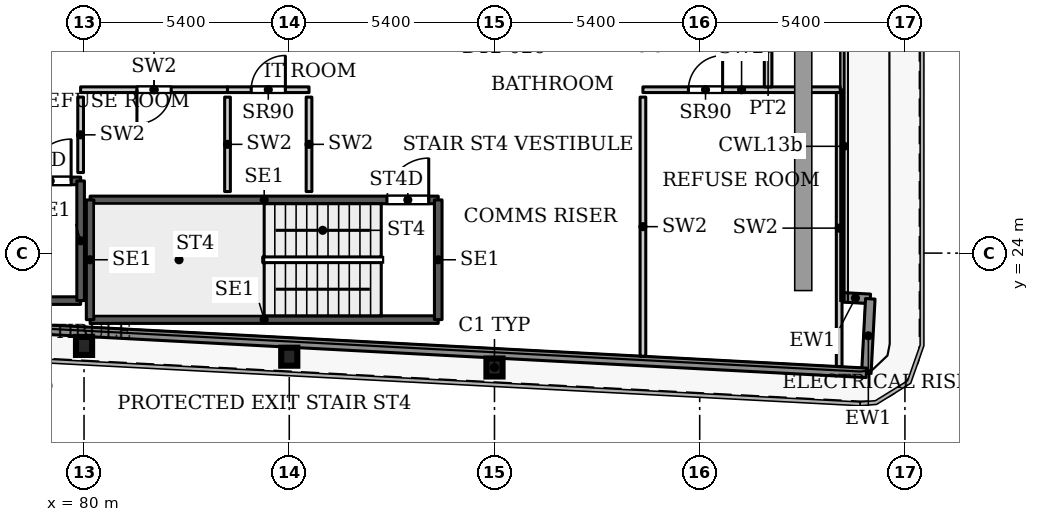
"""IFC4 building model, lengths in metres.
Left out: names, types, materials, properties, quantities, classifications, styles, units other than length and angle.
Written with IfcOpenShell. Run it as: python <this file> out.ifc"""

import sys

from ifc_helpers import new_model, si_unit, direction, frame, frame_2d, origin, origin_2d, place, context, subcontext, project, spatial, rectangle, i_section, extrude, source, transform, mapped, element, fill, save


model = new_model("IFC4")
c1 = context("Model", 3, precision=1e-05, world=origin(), true_north=direction((0.0, 1.0)))
c2 = subcontext(c1, "Body", "Model", "MODEL_VIEW")
j1 = project(units=[si_unit("LENGTHUNIT", "METRE"), si_unit("PLANEANGLEUNIT", "RADIAN")], contexts=[c1])
p1 = place(None, origin())
s1 = spatial("IfcSite", under=j1, at=p1, CompositionType="ELEMENT")
p2 = place(p1, origin())
s2 = spatial("IfcBuilding", under=s1, at=p2, CompositionType="ELEMENT")
p3 = place(p2, frame((0.0, 0.0, 53.9)))
s3 = spatial("IfcBuildingStorey", under=s2, at=p3, CompositionType="ELEMENT", Elevation=53.9)
for number, where, z_axis, x_axis in (
    (1, (90.8, 20.99, 0.0), (0.0, 0.0, 1.0), (1.0, 0.0, 0.0)),
    (2, (85.4, 21.274, 0.0), (0.0, 0.0, 1.0), (1.0, 0.0, 0.0)),
    (3, (80.0, 21.558, 0.0), (0.0, 0.0, 1.0), (1.0, 0.0, 0.0)),
):
    element("IfcColumn", number, at=place(p3, frame(where, z_axis=z_axis, x_axis=x_axis)), inside=s3, PredefinedType="COLUMN", context=c2, shape_type="SweptSolid", body=[
        extrude(i_section(OverallWidth=0.424, OverallDepth=0.474, WebThickness=0.048, FlangeThickness=0.077, FilletRadius=0.014, at=origin_2d()), origin(), (0.0, 0.0, 1.0), 3.9),
    ])
p4 = place(p3, frame((99.907, 22.839, 0.0), z_axis=(0.0, 0.0, 1.0), x_axis=(0.998561284263, -0.053622398031, 0.0)))
e4 = element("IfcWall", 4, at=p4, inside=s3, PredefinedType="SOLIDWALL", context=c2, shape_type="SweptSolid", body=[
    extrude(rectangle(XDim=0.783, YDim=0.25, at=frame_2d((0.392, 0.0))), origin(), (0.0, 0.0, 1.0), 3.75),
])
p5 = place(p3, frame((100.689, 22.797, 0.0), z_axis=(0.0, 0.0, 1.0), x_axis=(-0.052841433274, -0.998602915542, 0.0)))
e5 = element("IfcWall", 5, at=p5, inside=s3, PredefinedType="SOLIDWALL", context=c2, shape_type="SweptSolid", body=[
    extrude(rectangle(XDim=1.95, YDim=0.25, at=frame_2d((0.975, 0.0))), origin(), (0.0, 0.0, 1.0), 3.75),
])
p6 = place(p3, frame((100.586, 20.85, 0.0), z_axis=(0.0, 0.0, 1.0), x_axis=(-0.99861746497, 0.052565755559, 0.0)))
e6 = element("IfcWall", 6, at=p6, inside=s3, PredefinedType="SOLIDWALL", context=c2, shape_type="SweptSolid", body=[
    extrude(rectangle(XDim=66.639, YDim=0.25, at=frame_2d((33.319, 0.0))), origin(), (0.0, 0.0, 1.0), 3.75),
])
p7 = place(p3, frame((80.16, 22.25, 0.0), z_axis=(0.0, 0.0, 1.0), x_axis=(1.0, 0.0, 0.0)))
e7 = element("IfcWall", 7, at=p7, inside=s3, PredefinedType="SHEAR", context=c2, shape_type="SweptSolid", body=[
    extrude(rectangle(XDim=9.16, YDim=0.2, at=frame_2d((4.58, 0.0))), origin(), (0.0, 0.0, 1.0), 3.9),
])
p8 = place(p3, frame((80.16, 25.4, 0.0), z_axis=(0.0, 0.0, 1.0), x_axis=(1.0, 0.0, 0.0)))
e8 = element("IfcWall", 8, at=p8, inside=s3, PredefinedType="SHEAR", context=c2, shape_type="SweptSolid", body=[
    extrude(rectangle(XDim=9.16, YDim=0.2, at=frame_2d((4.58, 0.0))), origin(), (0.0, 0.0, 1.0), 3.9),
])
p9 = place(p8, frame((7.81, 0.0, 0.0)))
e9 = element("IfcOpeningElement", 9, at=p9, cuts=e8, PredefinedType="OPENING", context=c2, shape_type="SweptSolid", body=[
    extrude(rectangle(XDim=1.1, YDim=2.2, at=frame_2d((0.55, 1.1))), frame((0.0, 0.11, 0.0), z_axis=(0.0, -1.0, 0.0), x_axis=(1.0, 0.0, 0.0)), (0.0, 0.0, 1.0), 0.22),
])
for number, where, z_axis, x_axis in (
    (10, (80.16, 22.25, 0.0), (0.0, 0.0, 1.0), (0.0, 1.0, 0.0)),
    (11, (89.32, 22.25, 0.0), (0.0, 0.0, 1.0), (0.0, 1.0, 0.0)),
):
    element("IfcWall", number, at=place(p3, frame(where, z_axis=z_axis, x_axis=x_axis)), inside=s3, PredefinedType="SHEAR", context=c2, shape_type="SweptSolid", body=[
        extrude(rectangle(XDim=3.15, YDim=0.2, at=frame_2d((1.575, 0.0))), origin(), (0.0, 0.0, 1.0), 3.9),
    ])
p10 = place(p3, frame((70.75, 22.75, 0.0), z_axis=(0.0, 0.0, 1.0), x_axis=(1.0, 0.0, 0.0)))
e12 = element("IfcWall", 12, at=p10, inside=s3, PredefinedType="SHEAR", context=c2, shape_type="SweptSolid", body=[
    extrude(rectangle(XDim=9.16, YDim=0.2, at=frame_2d((4.58, 0.0))), origin(), (0.0, 0.0, 1.0), 3.9),
])
p11 = place(p3, frame((70.75, 25.9, 0.0), z_axis=(0.0, 0.0, 1.0), x_axis=(1.0, 0.0, 0.0)))
e13 = element("IfcWall", 13, at=p11, inside=s3, PredefinedType="SHEAR", context=c2, shape_type="SweptSolid", body=[
    extrude(rectangle(XDim=9.16, YDim=0.2, at=frame_2d((4.58, 0.0))), origin(), (0.0, 0.0, 1.0), 3.9),
])
p12 = place(p11, frame((7.81, 0.0, 0.0)))
e14 = element("IfcOpeningElement", 14, at=p12, cuts=e13, PredefinedType="OPENING", context=c2, shape_type="SweptSolid", body=[
    extrude(rectangle(XDim=1.1, YDim=2.2, at=frame_2d((0.55, 1.1))), frame((0.0, 0.11, 0.0), z_axis=(0.0, -1.0, 0.0), x_axis=(1.0, 0.0, 0.0)), (0.0, 0.0, 1.0), 0.22),
])
p13 = place(p3, frame((79.91, 22.75, 0.0), z_axis=(0.0, 0.0, 1.0), x_axis=(0.0, 1.0, 0.0)))
e15 = element("IfcWall", 15, at=p13, inside=s3, PredefinedType="SHEAR", context=c2, shape_type="SweptSolid", body=[
    extrude(rectangle(XDim=3.15, YDim=0.2, at=frame_2d((1.575, 0.0))), origin(), (0.0, 0.0, 1.0), 3.9),
])
p14 = place(p3, frame((79.91, 28.3, 0.0), z_axis=(0.0, 0.0, 1.0), x_axis=(1.0, 0.0, 0.0)))
e16 = element("IfcWall", 16, at=p14, inside=s3, PredefinedType="PARTITIONING", context=c2, shape_type="SweptSolid", body=[
    extrude(rectangle(XDim=3.865, YDim=0.15, at=frame_2d((1.933, 0.0))), origin(), (0.0, 0.0, 1.0), 3.9),
])
p15 = place(p14, frame((1.482, 0.0, 0.0)))
e17 = element("IfcOpeningElement", 17, at=p15, cuts=e16, PredefinedType="OPENING", context=c2, shape_type="SweptSolid", body=[
    extrude(rectangle(XDim=0.9, YDim=2.2, at=frame_2d((0.45, 1.1))), frame((0.0, 0.085, 0.0), z_axis=(0.0, -1.0, 0.0), x_axis=(1.0, 0.0, 0.0)), (0.0, 0.0, 1.0), 0.17),
])
p16 = place(p3, frame((79.91, 26.12, 0.0), z_axis=(0.0, 0.0, 1.0), x_axis=(0.0, 1.0, 0.0)))
e18 = element("IfcWall", 18, at=p16, inside=s3, PredefinedType="PARTITIONING", context=c2, shape_type="SweptSolid", body=[
    extrude(rectangle(XDim=1.985, YDim=0.15, at=frame_2d((0.992, 0.0))), origin(), (0.0, 0.0, 1.0), 3.9),
])
p17 = place(p3, frame((83.775, 25.62, 0.0), z_axis=(0.0, 0.0, 1.0), x_axis=(0.0, 1.0, 0.0)))
e19 = element("IfcWall", 19, at=p17, inside=s3, PredefinedType="PARTITIONING", context=c2, shape_type="SweptSolid", body=[
    extrude(rectangle(XDim=2.485, YDim=0.15, at=frame_2d((1.242, 0.0))), origin(), (0.0, 0.0, 1.0), 3.9),
])
p18 = place(p3, frame((83.775, 28.3, 0.0), z_axis=(0.0, 0.0, 1.0), x_axis=(1.0, 0.0, 0.0)))
e20 = element("IfcWall", 20, at=p18, inside=s3, PredefinedType="PARTITIONING", context=c2, shape_type="SweptSolid", body=[
    extrude(rectangle(XDim=2.145, YDim=0.15, at=frame_2d((1.073, 0.0))), origin(), (0.0, 0.0, 1.0), 3.9),
])
p19 = place(p18, frame((0.623, 0.0, 0.0)))
e21 = element("IfcOpeningElement", 21, at=p19, cuts=e20, PredefinedType="OPENING", context=c2, shape_type="SweptSolid", body=[
    extrude(rectangle(XDim=0.9, YDim=2.2, at=frame_2d((0.45, 1.1))), frame((0.0, 0.085, 0.0), z_axis=(0.0, -1.0, 0.0), x_axis=(1.0, 0.0, 0.0)), (0.0, 0.0, 1.0), 0.17),
])
p20 = place(p3, frame((85.92, 25.62, 0.0), z_axis=(0.0, 0.0, 1.0), x_axis=(0.0, 1.0, 0.0)))
e22 = element("IfcWall", 22, at=p20, inside=s3, PredefinedType="PARTITIONING", context=c2, shape_type="SweptSolid", body=[
    extrude(rectangle(XDim=2.485, YDim=0.15, at=frame_2d((1.242, 0.0))), origin(), (0.0, 0.0, 1.0), 3.9),
])
p21 = place(p3, frame((99.87, 21.015, 0.0), z_axis=(0.0, 0.0, 1.0), x_axis=(0.0, 1.0, 0.0)))
e23 = element("IfcWall", 23, at=p21, inside=s3, PredefinedType="PARTITIONING", context=c2, shape_type="SweptSolid", body=[
    extrude(rectangle(XDim=7.285, YDim=0.15, at=frame_2d((3.643, 0.0))), origin(), (0.0, 0.0, 1.0), 3.9),
])
p22 = place(p3, frame((94.706, 28.3, 0.0), z_axis=(0.0, 0.0, 1.0), x_axis=(1.0, 0.0, 0.0)))
e24 = element("IfcWall", 24, at=p22, inside=s3, PredefinedType="PARTITIONING", context=c2, shape_type="SweptSolid", body=[
    extrude(rectangle(XDim=5.192, YDim=0.15, at=frame_2d((2.596, 0.0))), origin(), (0.0, 0.0, 1.0), 3.9),
])
p23 = place(p22, frame((1.197, 0.0, 0.0)))
e25 = element("IfcOpeningElement", 25, at=p23, cuts=e24, PredefinedType="OPENING", context=c2, shape_type="SweptSolid", body=[
    extrude(rectangle(XDim=0.9, YDim=2.2, at=frame_2d((0.45, 1.1))), frame((0.0, 0.085, 0.0), z_axis=(0.0, -1.0, 0.0), x_axis=(1.0, 0.0, 0.0)), (0.0, 0.0, 1.0), 0.17),
])
p24 = place(p3, frame((94.706, 21.287, 0.0), z_axis=(0.0, 0.0, 1.0), x_axis=(0.0, 1.0, 0.0)))
e26 = element("IfcWall", 26, at=p24, inside=s3, PredefinedType="PARTITIONING", context=c2, shape_type="SweptSolid", body=[
    extrude(rectangle(XDim=6.818, YDim=0.15, at=frame_2d((3.409, 0.0))), origin(), (0.0, 0.0, 1.0), 3.9),
])
p25 = place(p3, frame((98.0, 28.374, 0.0), z_axis=(0.0, 0.0, 1.0), x_axis=(0.0, 1.0, 0.0)))
e27 = element("IfcWall", 27, at=p25, inside=s3, PredefinedType="PARTITIONING", context=c2, shape_type="SweptSolid", body=[
    extrude(rectangle(XDim=2.026, YDim=0.2, at=frame_2d((1.013, 0.0))), origin(), (0.0, 0.0, 1.0), 3.6),
])
m1 = source(origin(), c2, "Body", "SweptSolid", [
    extrude(rectangle(XDim=0.9, YDim=2.2, at=frame_2d((0.45, 1.1))), frame((0.0, 0.025, 0.0), z_axis=(0.0, -1.0, 0.0), x_axis=(1.0, 0.0, 0.0)), (0.0, 0.0, 1.0), 0.05),
])
p26 = place(p15, origin())
e28 = element("IfcDoor", 28, at=p26, inside=s3, OperationType="SINGLE_SWING_RIGHT", PredefinedType="DOOR", context=c2, shape_type="MappedRepresentation", body=[
    mapped(m1, transform((0.0, 0.0, 0.0), x_axis=(1.0, 0.0, 0.0), y_axis=(0.0, 1.0, 0.0), z_axis=(0.0, 0.0, 1.0), scale=1.0)),
])
fill(e17, e28)
p27 = place(p19, origin())
e29 = element("IfcDoor", 29, at=p27, inside=s3, OperationType="SINGLE_SWING_LEFT", PredefinedType="DOOR", context=c2, shape_type="MappedRepresentation", body=[
    mapped(m1, transform((0.0, 0.0, 0.0), x_axis=(1.0, 0.0, 0.0), y_axis=(0.0, 1.0, 0.0), z_axis=(0.0, 0.0, 1.0), scale=1.0)),
])
fill(e21, e29)
p28 = place(p23, origin())
e30 = element("IfcDoor", 30, at=p28, inside=s3, OperationType="SINGLE_SWING_LEFT", PredefinedType="DOOR", context=c2, shape_type="MappedRepresentation", body=[
    mapped(m1, transform((0.0, 0.0, 0.0), x_axis=(1.0, 0.0, 0.0), y_axis=(0.0, 1.0, 0.0), z_axis=(0.0, 0.0, 1.0), scale=1.0)),
])
fill(e25, e30)
m2 = source(origin(), c2, "Body", "SweptSolid", [
    extrude(rectangle(XDim=1.1, YDim=2.2, at=frame_2d((0.55, 1.1))), frame((0.0, 0.025, 0.0), z_axis=(0.0, -1.0, 0.0), x_axis=(1.0, 0.0, 0.0)), (0.0, 0.0, 1.0), 0.05),
])
p29 = place(p9, origin())
e31 = element("IfcDoor", 31, at=p29, inside=s3, OperationType="SINGLE_SWING_LEFT", PredefinedType="DOOR", context=c2, shape_type="MappedRepresentation", body=[
    mapped(m2, transform((0.0, 0.0, 0.0), x_axis=(1.0, 0.0, 0.0), y_axis=(0.0, 1.0, 0.0), z_axis=(0.0, 0.0, 1.0), scale=1.0)),
])
fill(e9, e31)
p30 = place(p12, origin())
e32 = element("IfcDoor", 32, at=p30, inside=s3, OperationType="SINGLE_SWING_LEFT", PredefinedType="DOOR", context=c2, shape_type="MappedRepresentation", body=[
    mapped(m2, transform((0.0, 0.0, 0.0), x_axis=(1.0, 0.0, 0.0), y_axis=(0.0, 1.0, 0.0), z_axis=(0.0, 0.0, 1.0), scale=1.0)),
])
fill(e14, e32)
save(model, sys.argv[1])
